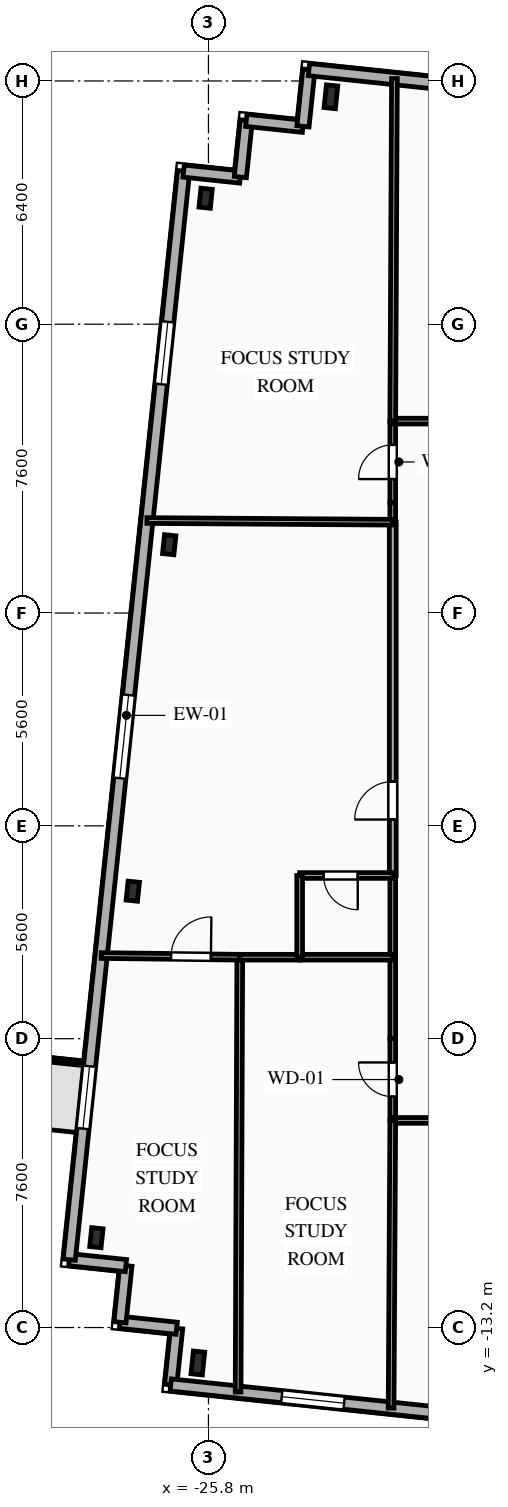
"""IFC4 building model, lengths in metres.
Left out: names, types, materials, properties, quantities, classifications, styles, units other than length and angle.
Written with IfcOpenShell. Run it as: python <this file> out.ifc"""

import sys

from ifc_helpers import new_model, si_unit, direction, frame, frame_2d, origin, origin_2d, place, context, subcontext, project, spatial, rectangle, i_section, extrude, element, fill, save


model = new_model("IFC4")
c1 = context("Model", 3, precision=1e-05, world=origin(), true_north=direction((0.0, 1.0)))
c2 = subcontext(c1, "Body", "Model", "MODEL_VIEW")
j1 = project(units=[si_unit("LENGTHUNIT", "METRE"), si_unit("PLANEANGLEUNIT", "RADIAN")], contexts=[c1])
p1 = place(None, origin())
s1 = spatial("IfcSite", under=j1, at=p1, CompositionType="ELEMENT")
p2 = place(p1, origin())
s2 = spatial("IfcBuilding", under=s1, at=p2, CompositionType="ELEMENT")
p3 = place(p2, frame((0.0, 0.0, 206.45)))
s3 = spatial("IfcBuildingStorey", under=s2, at=p3, CompositionType="ELEMENT", Elevation=206.45)
for number, where, z_axis, x_axis in (
    (1, (-26.079, -14.133, 0.0), (0.0, 0.0, 1.0), (0.995, -0.105, 0.0)),
    (2, (-22.577, 19.184, 0.0), (0.0, 0.0, 1.0), (0.995, -0.105, 0.0)),
):
    element("IfcColumn", number, at=place(p3, frame(where, z_axis=z_axis, x_axis=x_axis)), inside=s3, PredefinedType="COLUMN", context=c2, shape_type="SweptSolid", body=[
        extrude(i_section(OverallWidth=0.3, OverallDepth=0.6, WebThickness=0.015, FlangeThickness=0.03, FilletRadius=0.027, at=origin_2d()), origin(), (0.0, 0.0, 1.0), 3.35),
    ])
for number, where, z_axis, x_axis in (
    (3, (-25.875, 16.514, 0.0), (0.0, 0.0, 1.0), (0.995, -0.105, 0.0)),
    (4, (-26.833, 7.398, 0.0), (0.0, 0.0, 1.0), (0.995, -0.105, 0.0)),
    (5, (-27.791, -1.719, 0.0), (0.0, 0.0, 1.0), (0.995, -0.105, 0.0)),
    (6, (-28.749, -10.835, 0.0), (0.0, 0.0, 1.0), (0.995, -0.105, 0.0)),
):
    element("IfcColumn", number, at=place(p3, frame(where, z_axis=z_axis, x_axis=x_axis)), inside=s3, PredefinedType="COLUMN", context=c2, shape_type="SweptSolid", body=[
        extrude(i_section(OverallWidth=0.3, OverallDepth=0.5, WebThickness=0.014, FlangeThickness=0.028, FilletRadius=0.027, at=origin_2d()), origin(), (0.0, 0.0, 1.0), 3.35),
    ])
for number, where, z_axis, x_axis in (
    (7, (-26.793, -14.711, 0.0), (0.0, 0.0, 1.0), (0.104, 0.995, 0.0)),
    (8, (-26.637, -13.219, 0.0), (0.0, 0.0, 1.0), (-0.995, 0.104, 0.0)),
):
    element("IfcWall", number, at=place(p3, frame(where, z_axis=z_axis, x_axis=x_axis)), inside=s3, PredefinedType="SOLIDWALL", context=c2, shape_type="SweptSolid", body=[
        extrude(rectangle(XDim=1.5, YDim=0.32, at=frame_2d((0.75, 0.0))), origin(), (0.0, 0.0, 1.0), 3.04),
    ])
p4 = place(p3, frame((-28.128, -13.062, 0.0), z_axis=(0.0, 0.0, 1.0), x_axis=(0.104481464157, 0.994526834051, 0.0)))
e9 = element("IfcWall", 9, at=p4, inside=s3, PredefinedType="SOLIDWALL", context=c2, shape_type="SweptSolid", body=[
    extrude(rectangle(XDim=1.5, YDim=0.32, at=frame_2d((0.75, 0.0))), origin(), (0.0, 0.0, 1.0), 3.04),
])
p5 = place(p3, frame((-27.972, -11.571, 0.0), z_axis=(0.0, 0.0, 1.0), x_axis=(-0.994525057048, 0.104498377516, 0.0)))
e10 = element("IfcWall", 10, at=p5, inside=s3, PredefinedType="SOLIDWALL", context=c2, shape_type="SweptSolid", body=[
    extrude(rectangle(XDim=1.5, YDim=0.32, at=frame_2d((0.75, 0.0))), origin(), (0.0, 0.0, 1.0), 3.04),
])
p6 = place(p3, frame((-29.463, -11.414, 0.0), z_axis=(0.0, 0.0, 1.0), x_axis=(0.104530779244, 0.994521651947, 0.0)))
e11 = element("IfcWall", 11, at=p6, inside=s3, PredefinedType="SOLIDWALL", context=c2, shape_type="SweptSolid", body=[
    extrude(rectangle(XDim=28.8, YDim=0.32, at=frame_2d((14.4, 0.0))), origin(), (0.0, 0.0, 1.0), 3.04),
])
p7 = place(p6, frame((3.467, 0.0, 0.85)))
e12 = element("IfcOpeningElement", 12, at=p7, cuts=e11, PredefinedType="OPENING", context=c2, shape_type="SweptSolid", body=[
    extrude(rectangle(XDim=1.65, YDim=1.85, at=frame_2d((0.825, 0.925))), frame((0.0, 0.17, 0.0), z_axis=(0.0, -1.0, 0.0), x_axis=(1.0, 0.0, 0.0)), (0.0, 0.0, 1.0), 0.34),
])
p8 = place(p6, frame((12.738, 0.0, 0.85)))
e13 = element("IfcOpeningElement", 13, at=p8, cuts=e11, PredefinedType="OPENING", context=c2, shape_type="SweptSolid", body=[
    extrude(rectangle(XDim=2.2, YDim=1.85, at=frame_2d((1.1, 0.925))), frame((0.0, 0.17, 0.0), z_axis=(0.0, -1.0, 0.0), x_axis=(1.0, 0.0, 0.0)), (0.0, 0.0, 1.0), 0.34),
])
p9 = place(p6, frame((23.162, 0.0, 0.85)))
e14 = element("IfcOpeningElement", 14, at=p9, cuts=e11, PredefinedType="OPENING", context=c2, shape_type="SweptSolid", body=[
    extrude(rectangle(XDim=1.65, YDim=1.85, at=frame_2d((0.825, 0.925))), frame((0.0, 0.17, 0.0), z_axis=(0.0, -1.0, 0.0), x_axis=(1.0, 0.0, 0.0)), (0.0, 0.0, 1.0), 0.34),
])
p10 = place(p3, frame((-26.453, 17.229, 0.0), z_axis=(0.0, 0.0, 1.0), x_axis=(0.994508128223, -0.104659366031, 0.0)))
e15 = element("IfcWall", 15, at=p10, inside=s3, PredefinedType="SOLIDWALL", context=c2, shape_type="SweptSolid", body=[
    extrude(rectangle(XDim=1.5, YDim=0.32, at=frame_2d((0.75, 0.0))), origin(), (0.0, 0.0, 1.0), 3.04),
])
p11 = place(p3, frame((-24.961, 17.072, 0.0), z_axis=(0.0, 0.0, 1.0), x_axis=(0.104642427191, 0.994509910675, 0.0)))
e16 = element("IfcWall", 16, at=p11, inside=s3, PredefinedType="SOLIDWALL", context=c2, shape_type="SweptSolid", body=[
    extrude(rectangle(XDim=1.5, YDim=0.32, at=frame_2d((0.75, 0.0))), origin(), (0.0, 0.0, 1.0), 3.04),
])
p12 = place(p3, frame((-24.804, 18.563, 0.0), z_axis=(0.0, 0.0, 1.0), x_axis=(0.994508128223, -0.104659366031, 0.0)))
e17 = element("IfcWall", 17, at=p12, inside=s3, PredefinedType="SOLIDWALL", context=c2, shape_type="SweptSolid", body=[
    extrude(rectangle(XDim=1.5, YDim=0.32, at=frame_2d((0.75, 0.0))), origin(), (0.0, 0.0, 1.0), 3.04),
])
p13 = place(p3, frame((-23.312, 18.406, 0.0), z_axis=(0.0, 0.0, 1.0), x_axis=(0.104481464157, 0.994526834051, 0.0)))
e18 = element("IfcWall", 18, at=p13, inside=s3, PredefinedType="SOLIDWALL", context=c2, shape_type="SweptSolid", body=[
    extrude(rectangle(XDim=1.5, YDim=0.32, at=frame_2d((0.75, 0.0))), origin(), (0.0, 0.0, 1.0), 3.04),
])
p14 = place(p3, frame((-23.156, 19.898, 0.0), z_axis=(0.0, 0.0, 1.0), x_axis=(0.994522001802, -0.104527450613, 0.0)))
e19 = element("IfcWall", 19, at=p14, inside=s3, PredefinedType="SOLIDWALL", context=c2, shape_type="SweptSolid", body=[
    extrude(rectangle(XDim=45.8, YDim=0.32, at=frame_2d((22.9, 0.0))), origin(), (0.0, 0.0, 1.0), 3.04),
])
p15 = place(p14, frame((6.021, 0.0, 0.85)))
e20 = element("IfcOpeningElement", 20, at=p15, cuts=e19, PredefinedType="OPENING", context=c2, shape_type="SweptSolid", body=[
    extrude(rectangle(XDim=1.65, YDim=1.85, at=frame_2d((0.825, 0.925))), frame((0.0, 0.17, 0.0), z_axis=(0.0, -1.0, 0.0), x_axis=(1.0, 0.0, 0.0)), (0.0, 0.0, 1.0), 0.34),
])
p16 = place(p14, frame((15.985, 0.0, 0.85)))
e21 = element("IfcOpeningElement", 21, at=p16, cuts=e19, PredefinedType="OPENING", context=c2, shape_type="SweptSolid", body=[
    extrude(rectangle(XDim=1.5, YDim=1.85, at=frame_2d((0.75, 0.925))), frame((0.0, 0.17, 0.0), z_axis=(0.0, -1.0, 0.0), x_axis=(1.0, 0.0, 0.0)), (0.0, 0.0, 1.0), 0.34),
])
p17 = place(p14, frame((22.881, 0.0, 0.85)))
e22 = element("IfcOpeningElement", 22, at=p17, cuts=e19, PredefinedType="OPENING", context=c2, shape_type="SweptSolid", body=[
    extrude(rectangle(XDim=2.2, YDim=1.85, at=frame_2d((1.1, 0.925))), frame((0.0, 0.17, 0.0), z_axis=(0.0, -1.0, 0.0), x_axis=(1.0, 0.0, 0.0)), (0.0, 0.0, 1.0), 0.34),
])
p18 = place(p14, frame((31.288, 0.0, 0.85)))
e23 = element("IfcOpeningElement", 23, at=p18, cuts=e19, PredefinedType="OPENING", context=c2, shape_type="SweptSolid", body=[
    extrude(rectangle(XDim=2.2, YDim=1.85, at=frame_2d((1.1, 0.925))), frame((0.0, 0.17, 0.0), z_axis=(0.0, -1.0, 0.0), x_axis=(1.0, 0.0, 0.0)), (0.0, 0.0, 1.0), 0.34),
])
p19 = place(p14, frame((39.69, 0.0, 0.85)))
e24 = element("IfcOpeningElement", 24, at=p19, cuts=e19, PredefinedType="OPENING", context=c2, shape_type="SweptSolid", body=[
    extrude(rectangle(XDim=1.65, YDim=1.85, at=frame_2d((0.825, 0.925))), frame((0.0, 0.17, 0.0), z_axis=(0.0, -1.0, 0.0), x_axis=(1.0, 0.0, 0.0)), (0.0, 0.0, 1.0), 0.34),
])
p20 = place(p3, frame((18.756, -19.498, 0.0), z_axis=(0.0, 0.0, 1.0), x_axis=(-0.994522060044, 0.104526896475, 0.0)))
e25 = element("IfcWall", 25, at=p20, inside=s3, PredefinedType="SOLIDWALL", context=c2, shape_type="SweptSolid", body=[
    extrude(rectangle(XDim=45.8, YDim=0.32, at=frame_2d((22.9, 0.0))), origin(), (0.0, 0.0, 1.0), 3.04),
])
p21 = place(p20, frame((2.778, 0.0, 0.85)))
e26 = element("IfcOpeningElement", 26, at=p21, cuts=e25, PredefinedType="OPENING", context=c2, shape_type="SweptSolid", body=[
    extrude(rectangle(XDim=1.65, YDim=1.85, at=frame_2d((0.825, 0.925))), frame((0.0, 0.17, 0.0), z_axis=(0.0, -1.0, 0.0), x_axis=(1.0, 0.0, 0.0)), (0.0, 0.0, 1.0), 0.34),
])
p22 = place(p20, frame((7.948, 0.0, 0.85)))
e27 = element("IfcOpeningElement", 27, at=p22, cuts=e25, PredefinedType="OPENING", context=c2, shape_type="SweptSolid", body=[
    extrude(rectangle(XDim=2.2, YDim=1.85, at=frame_2d((1.1, 0.925))), frame((0.0, 0.17, 0.0), z_axis=(0.0, -1.0, 0.0), x_axis=(1.0, 0.0, 0.0)), (0.0, 0.0, 1.0), 0.34),
])
p23 = place(p20, frame((14.954, 0.0, 0.85)))
e28 = element("IfcOpeningElement", 28, at=p23, cuts=e25, PredefinedType="OPENING", context=c2, shape_type="SweptSolid", body=[
    extrude(rectangle(XDim=2.2, YDim=1.85, at=frame_2d((1.1, 0.925))), frame((0.0, 0.17, 0.0), z_axis=(0.0, -1.0, 0.0), x_axis=(1.0, 0.0, 0.0)), (0.0, 0.0, 1.0), 0.34),
])
p24 = place(p20, frame((21.96, 0.0, 0.85)))
e29 = element("IfcOpeningElement", 29, at=p24, cuts=e25, PredefinedType="OPENING", context=c2, shape_type="SweptSolid", body=[
    extrude(rectangle(XDim=2.2, YDim=1.85, at=frame_2d((1.1, 0.925))), frame((0.0, 0.17, 0.0), z_axis=(0.0, -1.0, 0.0), x_axis=(1.0, 0.0, 0.0)), (0.0, 0.0, 1.0), 0.34),
])
p25 = place(p20, frame((29.006, 0.0, 0.85)))
e30 = element("IfcOpeningElement", 30, at=p25, cuts=e25, PredefinedType="OPENING", context=c2, shape_type="SweptSolid", body=[
    extrude(rectangle(XDim=2.2, YDim=1.85, at=frame_2d((1.1, 0.925))), frame((0.0, 0.17, 0.0), z_axis=(0.0, -1.0, 0.0), x_axis=(1.0, 0.0, 0.0)), (0.0, 0.0, 1.0), 0.34),
])
p26 = place(p20, frame((35.429, 0.0, 0.85)))
e31 = element("IfcOpeningElement", 31, at=p26, cuts=e25, PredefinedType="OPENING", context=c2, shape_type="SweptSolid", body=[
    extrude(rectangle(XDim=1.65, YDim=1.85, at=frame_2d((0.825, 0.925))), frame((0.0, 0.17, 0.0), z_axis=(0.0, -1.0, 0.0), x_axis=(1.0, 0.0, 0.0)), (0.0, 0.0, 1.0), 0.34),
])
p27 = place(p20, frame((41.212, 0.0, 0.85)))
e32 = element("IfcOpeningElement", 32, at=p27, cuts=e25, PredefinedType="OPENING", context=c2, shape_type="SweptSolid", body=[
    extrude(rectangle(XDim=1.65, YDim=1.85, at=frame_2d((0.825, 0.925))), frame((0.0, 0.17, 0.0), z_axis=(0.0, -1.0, 0.0), x_axis=(1.0, 0.0, 0.0)), (0.0, 0.0, 1.0), 0.34),
])
p28 = place(p3, frame((-20.95, 8.5, 0.0), z_axis=(0.0, 0.0, 1.0), x_axis=(0.0, 1.0, 0.0)))
e33 = element("IfcWall", 33, at=p28, inside=s3, PredefinedType="PARTITIONING", context=c2, shape_type="SweptSolid", body=[
    extrude(rectangle(XDim=2.15, YDim=0.15, at=frame_2d((1.075, 0.0))), origin(), (0.0, 0.0, 1.0), 3.04),
])
p29 = place(p28, frame((0.625, 0.0, 0.0)))
e34 = element("IfcOpeningElement", 34, at=p29, cuts=e33, PredefinedType="OPENING", context=c2, shape_type="SweptSolid", body=[
    extrude(rectangle(XDim=0.9, YDim=2.1, at=frame_2d((0.45, 1.05))), frame((0.0, 0.085, 0.0), z_axis=(0.0, -1.0, 0.0), x_axis=(1.0, 0.0, 0.0)), (0.0, 0.0, 1.0), 0.17),
])
p30 = place(p3, frame((-20.95, 10.65, 0.0), z_axis=(0.0, 0.0, 1.0), x_axis=(1.0, 0.0, 0.0)))
e35 = element("IfcWall", 35, at=p30, inside=s3, PredefinedType="PARTITIONING", context=c2, shape_type="SweptSolid", body=[
    extrude(rectangle(XDim=8.98, YDim=0.15, at=frame_2d((4.49, 0.0))), origin(), (0.0, 0.0, 1.0), 3.04),
])
p31 = place(p30, frame((6.504, 0.0, 0.0)))
e36 = element("IfcOpeningElement", 36, at=p31, cuts=e35, PredefinedType="OPENING", context=c2, shape_type="SweptSolid", body=[
    extrude(rectangle(XDim=1.05, YDim=2.15, at=frame_2d((0.525, 1.075))), frame((0.0, 0.085, 0.0), z_axis=(0.0, -1.0, 0.0), x_axis=(1.0, 0.0, 0.0)), (0.0, 0.0, 1.0), 0.17),
])
p32 = place(p3, frame((-20.95, -7.75, 0.0), z_axis=(0.0, 0.0, 1.0), x_axis=(0.0, 1.0, 0.0)))
e37 = element("IfcWall", 37, at=p32, inside=s3, PredefinedType="PARTITIONING", context=c2, shape_type="SweptSolid", body=[
    extrude(rectangle(XDim=2.15, YDim=0.15, at=frame_2d((1.075, 0.0))), origin(), (0.0, 0.0, 1.0), 3.04),
])
p33 = place(p32, frame((0.625, 0.0, 0.0)))
e38 = element("IfcOpeningElement", 38, at=p33, cuts=e37, PredefinedType="OPENING", context=c2, shape_type="SweptSolid", body=[
    extrude(rectangle(XDim=0.9, YDim=2.1, at=frame_2d((0.45, 1.05))), frame((0.0, 0.085, 0.0), z_axis=(0.0, -1.0, 0.0), x_axis=(1.0, 0.0, 0.0)), (0.0, 0.0, 1.0), 0.17),
])
p34 = place(p3, frame((-14.567, -7.75, 0.0), z_axis=(0.0, 0.0, 1.0), x_axis=(-1.0, 0.0, 0.0)))
e39 = element("IfcWall", 39, at=p34, inside=s3, PredefinedType="PARTITIONING", context=c2, shape_type="SweptSolid", body=[
    extrude(rectangle(XDim=6.383, YDim=0.15, at=frame_2d((3.191, 0.0))), origin(), (0.0, 0.0, 1.0), 3.04),
])
p35 = place(p34, frame((1.102, 0.0, 0.0)))
e40 = element("IfcOpeningElement", 40, at=p35, cuts=e39, PredefinedType="OPENING", context=c2, shape_type="SweptSolid", body=[
    extrude(rectangle(XDim=1.05, YDim=2.15, at=frame_2d((0.525, 1.075))), frame((0.0, 0.085, 0.0), z_axis=(0.0, -1.0, 0.0), x_axis=(1.0, 0.0, 0.0)), (0.0, 0.0, 1.0), 0.17),
])
p36 = place(p3, frame((-20.95, -5.6, 0.0), z_axis=(0.0, 0.0, 1.0), x_axis=(0.0, 1.0, 0.0)))
e41 = element("IfcWall", 41, at=p36, inside=s3, PredefinedType="PARTITIONING", context=c2, shape_type="SweptSolid", body=[
    extrude(rectangle(XDim=2.144, YDim=0.15, at=frame_2d((1.072, 0.0))), origin(), (0.0, 0.0, 1.0), 3.04),
])
p37 = place(p3, frame((-20.95, -1.306, 0.0), z_axis=(0.0, 0.0, 1.0), x_axis=(0.0, 1.0, 0.0)))
e42 = element("IfcWall", 42, at=p37, inside=s3, PredefinedType="PARTITIONING", context=c2, shape_type="SweptSolid", body=[
    extrude(rectangle(XDim=9.296, YDim=0.18, at=frame_2d((4.648, 0.0))), origin(), (0.0, 0.0, 1.0), 3.04),
])
p38 = place(p37, frame((1.472, 0.0, 0.0)))
e43 = element("IfcOpeningElement", 43, at=p38, cuts=e42, PredefinedType="OPENING", context=c2, shape_type="SweptSolid", body=[
    extrude(rectangle(XDim=1.0, YDim=2.15, at=frame_2d((0.5, 1.075))), frame((0.0, 0.1, 0.0), z_axis=(0.0, -1.0, 0.0), x_axis=(1.0, 0.0, 0.0)), (0.0, 0.0, 1.0), 0.2),
])
p39 = place(p3, frame((-20.95, -3.456, 0.0), z_axis=(0.0, 0.0, 1.0), x_axis=(0.0, 1.0, 0.0)))
e44 = element("IfcWall", 44, at=p39, inside=s3, PredefinedType="PLUMBINGWALL", context=c2, shape_type="SweptSolid", body=[
    extrude(rectangle(XDim=2.15, YDim=0.15, at=frame_2d((1.075, 0.0))), origin(), (0.0, 0.0, 1.0), 3.04),
])
p40 = place(p3, frame((-20.95, 7.99, 0.0), z_axis=(0.0, 0.0, 1.0), x_axis=(0.0, 1.0, 0.0)))
e45 = element("IfcWall", 45, at=p40, inside=s3, PredefinedType="PARTITIONING", context=c2, shape_type="SweptSolid", body=[
    extrude(rectangle(XDim=0.51, YDim=0.15, at=frame_2d((0.255, 0.0))), origin(), (0.0, 0.0, 1.0), 3.04),
])
p41 = place(p3, frame((-24.976, -3.456, 0.0), z_axis=(0.0, 0.0, 1.0), x_axis=(-0.003840873, -0.99999262382, 0.0)))
e46 = element("IfcWall", 46, at=p41, inside=s3, PredefinedType="PARTITIONING", context=c2, shape_type="SweptSolid", body=[
    extrude(rectangle(XDim=11.441, YDim=0.15, at=frame_2d((5.721, 0.0))), origin(), (0.0, 0.0, 1.0), 3.04),
])
p42 = place(p3, frame((-28.622, -3.412, 0.0), z_axis=(0.0, 0.0, 1.0), x_axis=(0.999927389555, -0.01205054433, 0.0)))
e47 = element("IfcWall", 47, at=p42, inside=s3, PredefinedType="PARTITIONING", context=c2, shape_type="SweptSolid", body=[
    extrude(rectangle(XDim=3.647, YDim=0.15, at=frame_2d((1.823, 0.0))), origin(), (0.0, 0.0, 1.0), 3.04),
])
p43 = place(p42, frame((1.837, 0.0, 0.0)))
e48 = element("IfcOpeningElement", 48, at=p43, cuts=e47, PredefinedType="OPENING", context=c2, shape_type="SweptSolid", body=[
    extrude(rectangle(XDim=1.05, YDim=2.15, at=frame_2d((0.525, 1.075))), frame((0.0, 0.085, 0.0), z_axis=(0.0, -1.0, 0.0), x_axis=(1.0, 0.0, 0.0)), (0.0, 0.0, 1.0), 0.17),
])
p44 = place(p3, frame((-24.976, -3.456, 0.0), z_axis=(0.0, 0.0, 1.0), x_axis=(1.0, 0.0, 0.0)))
e49 = element("IfcWall", 49, at=p44, inside=s3, PredefinedType="PARTITIONING", context=c2, shape_type="SweptSolid", body=[
    extrude(rectangle(XDim=1.576, YDim=0.15, at=frame_2d((0.788, 0.0))), origin(), (0.0, 0.0, 1.0), 3.04),
])
p45 = place(p3, frame((-23.4, -3.456, 0.0), z_axis=(0.0, 0.0, 1.0), x_axis=(1.0, 0.0, 0.0)))
e50 = element("IfcWall", 50, at=p45, inside=s3, PredefinedType="PLUMBINGWALL", context=c2, shape_type="SweptSolid", body=[
    extrude(rectangle(XDim=2.45, YDim=0.15, at=frame_2d((1.225, 0.0))), origin(), (0.0, 0.0, 1.0), 3.04),
])
p46 = place(p3, frame((-20.95, -7.75, 0.0), z_axis=(0.0, 0.0, 1.0), x_axis=(-0.005804668564, -0.99998315277, 0.0)))
e51 = element("IfcWall", 51, at=p46, inside=s3, PredefinedType="PARTITIONING", context=c2, shape_type="SweptSolid", body=[
    extrude(rectangle(XDim=7.571, YDim=0.15, at=frame_2d((3.785, 0.0))), origin(), (0.0, 0.0, 1.0), 3.04),
])
p47 = place(p3, frame((-20.95, -1.306, 0.0), z_axis=(0.0, 0.0, 1.0), x_axis=(-1.0, 0.0, 0.0)))
e52 = element("IfcWall", 52, at=p47, inside=s3, PredefinedType="PLUMBINGWALL", context=c2, shape_type="SweptSolid", body=[
    extrude(rectangle(XDim=2.45, YDim=0.15, at=frame_2d((1.225, 0.0))), origin(), (0.0, 0.0, 1.0), 3.04),
])
p48 = place(p47, frame((0.921, 0.0, 0.0)))
e53 = element("IfcOpeningElement", 53, at=p48, cuts=e52, PredefinedType="OPENING", context=c2, shape_type="SweptSolid", body=[
    extrude(rectangle(XDim=0.9, YDim=2.1, at=frame_2d((0.45, 1.05))), frame((0.0, 0.085, 0.0), z_axis=(0.0, -1.0, 0.0), x_axis=(1.0, 0.0, 0.0)), (0.0, 0.0, 1.0), 0.17),
])
p49 = place(p3, frame((-23.4, -1.306, 0.0), z_axis=(0.0, 0.0, 1.0), x_axis=(0.0, -1.0, 0.0)))
e54 = element("IfcWall", 54, at=p49, inside=s3, PredefinedType="PLUMBINGWALL", context=c2, shape_type="SweptSolid", body=[
    extrude(rectangle(XDim=2.15, YDim=0.15, at=frame_2d((1.075, 0.0))), origin(), (0.0, 0.0, 1.0), 2.695),
])
p50 = place(p3, frame((-27.419, 8.034, 0.0), z_axis=(0.0, 0.0, 1.0), x_axis=(0.999976928608, -0.006792808784, 0.0)))
e55 = element("IfcWall", 55, at=p50, inside=s3, PredefinedType="PARTITIONING", context=c2, shape_type="SweptSolid", body=[
    extrude(rectangle(XDim=6.469, YDim=0.15, at=frame_2d((3.235, 0.0))), origin(), (0.0, 0.0, 1.0), 3.04),
])
p51 = place(p3, frame((-20.906, 19.662, 0.0), z_axis=(0.0, 0.0, 1.0), x_axis=(-0.004876272857, -0.999988110911, 0.0)))
e56 = element("IfcWall", 56, at=p51, inside=s3, PredefinedType="PARTITIONING", context=c2, shape_type="SweptSolid", body=[
    extrude(rectangle(XDim=9.012, YDim=0.15, at=frame_2d((4.506, 0.0))), origin(), (0.0, 0.0, 1.0), 2.665),
])
p52 = place(p7, origin())
e57 = element("IfcWindow", 57, at=p52, inside=s3, PartitioningType="SINGLE_PANEL", PredefinedType="WINDOW", context=c2, shape_type="SweptSolid", body=[
    extrude(rectangle(XDim=1.65, YDim=1.85, at=frame_2d((0.825, 0.925))), frame((0.0, 0.03, 0.0), z_axis=(0.0, -1.0, 0.0), x_axis=(1.0, 0.0, 0.0)), (0.0, 0.0, 1.0), 0.06),
])
fill(e12, e57)
p53 = place(p8, origin())
e58 = element("IfcWindow", 58, at=p53, inside=s3, PartitioningType="SINGLE_PANEL", PredefinedType="WINDOW", context=c2, shape_type="SweptSolid", body=[
    extrude(rectangle(XDim=2.2, YDim=1.85, at=frame_2d((1.1, 0.925))), frame((0.0, 0.03, 0.0), z_axis=(0.0, -1.0, 0.0), x_axis=(1.0, 0.0, 0.0)), (0.0, 0.0, 1.0), 0.06),
])
fill(e13, e58)
p54 = place(p9, origin())
e59 = element("IfcWindow", 59, at=p54, inside=s3, PartitioningType="SINGLE_PANEL", PredefinedType="WINDOW", context=c2, shape_type="SweptSolid", body=[
    extrude(rectangle(XDim=1.65, YDim=1.85, at=frame_2d((0.825, 0.925))), frame((0.0, 0.03, 0.0), z_axis=(0.0, -1.0, 0.0), x_axis=(1.0, 0.0, 0.0)), (0.0, 0.0, 1.0), 0.06),
])
fill(e14, e59)
p55 = place(p27, origin())
e60 = element("IfcWindow", 60, at=p55, inside=s3, PartitioningType="SINGLE_PANEL", PredefinedType="WINDOW", context=c2, shape_type="SweptSolid", body=[
    extrude(rectangle(XDim=1.65, YDim=1.85, at=frame_2d((0.825, 0.925))), frame((0.0, 0.03, 0.0), z_axis=(0.0, -1.0, 0.0), x_axis=(1.0, 0.0, 0.0)), (0.0, 0.0, 1.0), 0.06),
])
fill(e32, e60)
p56 = place(p29, origin())
e61 = element("IfcDoor", 61, at=p56, inside=s3, OperationType="SINGLE_SWING_LEFT", PredefinedType="DOOR", context=c2, shape_type="SweptSolid", body=[
    extrude(rectangle(XDim=0.9, YDim=2.1, at=frame_2d((0.45, 1.05))), frame((0.0, 0.025, 0.0), z_axis=(0.0, -1.0, 0.0), x_axis=(1.0, 0.0, 0.0)), (0.0, 0.0, 1.0), 0.05),
])
fill(e34, e61)
p57 = place(p33, origin())
e62 = element("IfcDoor", 62, at=p57, inside=s3, OperationType="SINGLE_SWING_RIGHT", PredefinedType="DOOR", context=c2, shape_type="SweptSolid", body=[
    extrude(rectangle(XDim=0.9, YDim=2.1, at=frame_2d((0.45, 1.05))), frame((0.0, 0.025, 0.0), z_axis=(0.0, -1.0, 0.0), x_axis=(1.0, 0.0, 0.0)), (0.0, 0.0, 1.0), 0.05),
])
fill(e38, e62)
p58 = place(p38, origin())
e63 = element("IfcDoor", 63, at=p58, inside=s3, OperationType="SINGLE_SWING_LEFT", PredefinedType="DOOR", context=c2, shape_type="SweptSolid", body=[
    extrude(rectangle(XDim=1.0, YDim=2.15, at=frame_2d((0.5, 1.075))), frame((0.0, 0.025, 0.0), z_axis=(0.0, -1.0, 0.0), x_axis=(1.0, 0.0, 0.0)), (0.0, 0.0, 1.0), 0.05),
])
fill(e43, e63)
p59 = place(p43, origin())
e64 = element("IfcDoor", 64, at=p59, inside=s3, OperationType="SINGLE_SWING_RIGHT", PredefinedType="DOOR", context=c2, shape_type="SweptSolid", body=[
    extrude(rectangle(XDim=1.05, YDim=2.15, at=frame_2d((0.525, 1.075))), frame((0.0, 0.025, 0.0), z_axis=(0.0, -1.0, 0.0), x_axis=(1.0, 0.0, 0.0)), (0.0, 0.0, 1.0), 0.05),
])
fill(e48, e64)
p60 = place(p48, origin())
e65 = element("IfcDoor", 65, at=p60, inside=s3, OperationType="SINGLE_SWING_LEFT", PredefinedType="DOOR", context=c2, shape_type="SweptSolid", body=[
    extrude(rectangle(XDim=0.9, YDim=2.1, at=frame_2d((0.45, 1.05))), frame((0.0, 0.025, 0.0), z_axis=(0.0, -1.0, 0.0), x_axis=(1.0, 0.0, 0.0)), (0.0, 0.0, 1.0), 0.05),
])
fill(e53, e65)
save(model, sys.argv[1])
